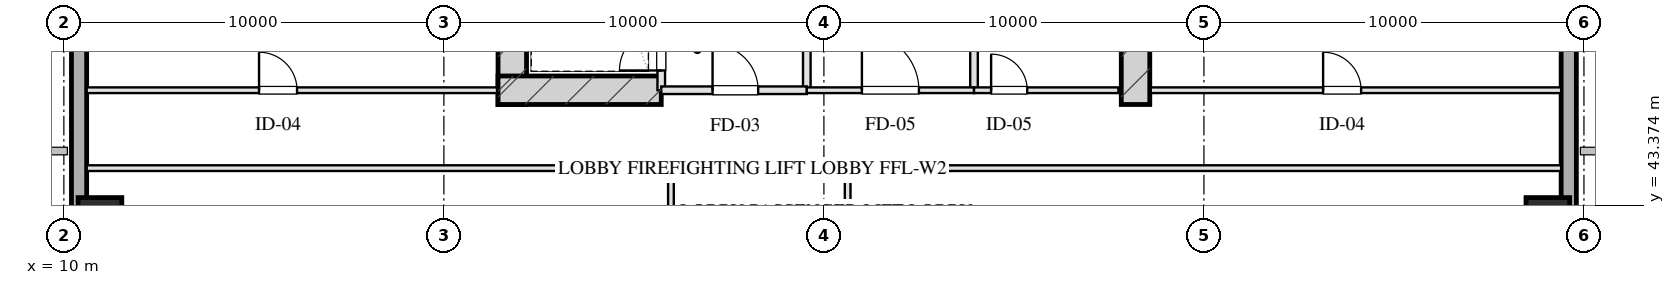
"""IFC4 building model, lengths in metres.
Left out: names, types, materials, properties, quantities, classifications, styles, units other than length and angle.
Written with IfcOpenShell. Run it as: python <this file> out.ifc"""

import sys

from ifc_helpers import new_model, si_unit, direction, frame, frame_2d, origin, origin_2d, place, context, subcontext, project, spatial, rectangle, hollow_rectangle, extrude, element, fill, save


model = new_model("IFC4")
c1 = context("Model", 3, precision=1e-05, world=origin(), true_north=direction((0.0, 1.0)))
c2 = subcontext(c1, "Body", "Model", "MODEL_VIEW")
j1 = project(units=[si_unit("LENGTHUNIT", "METRE"), si_unit("PLANEANGLEUNIT", "RADIAN")], contexts=[c1])
p1 = place(None, origin())
s1 = spatial("IfcSite", under=j1, at=p1, CompositionType="ELEMENT")
p2 = place(p1, origin())
s2 = spatial("IfcBuilding", under=s1, at=p2, CompositionType="ELEMENT")
p3 = place(p2, frame((0.0, 0.0, 34.0)))
s3 = spatial("IfcBuildingStorey", under=s2, at=p3, CompositionType="ELEMENT", Elevation=34.0)
for number, where, z_axis, x_axis in (
    (1, (21.8, 46.025, 0.0), (0.0, 0.0, 1.0), (0.0, 1.0, 0.0)),
    (2, (38.2, 46.025, 0.0), (0.0, 0.0, 1.0), (0.0, 1.0, 0.0)),
):
    element("IfcWall", number, at=place(p3, frame(where, z_axis=z_axis, x_axis=x_axis)), inside=s3, PredefinedType="SHEAR", context=c2, shape_type="SweptSolid", body=[
        extrude(rectangle(XDim=9.63, YDim=0.75, at=frame_2d((4.815, 0.0))), origin(), (0.0, 0.0, 1.0), 4.0),
    ])
p4 = place(p3, frame((21.425, 46.4, 0.0), z_axis=(0.0, 0.0, 1.0), x_axis=(1.0, 0.0, 0.0)))
e3 = element("IfcWall", 3, at=p4, inside=s3, PredefinedType="SHEAR", context=c2, shape_type="SweptSolid", body=[
    extrude(rectangle(XDim=4.295, YDim=0.75, at=frame_2d((2.147, 0.0))), origin(), (0.0, 0.0, 1.0), 4.0),
])
for number, where, z_axis, x_axis in (
    (4, (10.95, 43.0, 0.0), (0.0, 0.0, 1.0), (1.0, 0.0, 0.0)),
    (5, (49.05, 43.0, 0.0), (0.0, 0.0, 1.0), (1.0, 0.0, 0.0)),
):
    element("IfcColumn", number, at=place(p3, frame(where, z_axis=z_axis, x_axis=x_axis)), inside=s3, PredefinedType="COLUMN", context=c2, shape_type="SweptSolid", body=[
        extrude(hollow_rectangle(XDim=1.15, YDim=1.15, WallThickness=0.04, at=origin_2d()), origin(), (0.0, 0.0, 1.0), 4.001),
    ])
p5 = place(p3, frame((10.4, 7.2, 0.0), z_axis=(0.0, 0.0, 1.0), x_axis=(0.0, 1.0, 0.0)))
e6 = element("IfcWall", 6, at=p5, inside=s3, PredefinedType="SOLIDWALL", context=c2, shape_type="SweptSolid", body=[
    extrude(rectangle(XDim=53.6, YDim=0.4, at=frame_2d((26.8, 0.0))), origin(), (0.0, 0.0, 1.0), 3.16),
])
p6 = place(p5, frame((22.95, 0.0, 0.75)))
e7 = element("IfcOpeningElement", 7, at=p6, cuts=e6, PredefinedType="OPENING", context=c2, shape_type="SweptSolid", body=[
    extrude(rectangle(XDim=2.5, YDim=1.75, at=frame_2d((1.25, 0.875))), frame((0.0, 0.21, 0.0), z_axis=(0.0, -1.0, 0.0), x_axis=(1.0, 0.0, 0.0)), (0.0, 0.0, 1.0), 0.42),
])
p7 = place(p5, frame((29.35, 0.0, 0.0)))
e8 = element("IfcOpeningElement", 8, at=p7, cuts=e6, PredefinedType="OPENING", context=c2, shape_type="SweptSolid", body=[
    extrude(rectangle(XDim=1.1, YDim=2.15, at=frame_2d((0.55, 1.075))), frame((0.0, 0.21, 0.0), z_axis=(0.0, -1.0, 0.0), x_axis=(1.0, 0.0, 0.0)), (0.0, 0.0, 1.0), 0.42),
])
p8 = place(p3, frame((49.6, 60.8, 0.0), z_axis=(0.0, 0.0, 1.0), x_axis=(0.0, -1.0, 0.0)))
e9 = element("IfcWall", 9, at=p8, inside=s3, PredefinedType="SOLIDWALL", context=c2, shape_type="SweptSolid", body=[
    extrude(rectangle(XDim=53.6, YDim=0.4, at=frame_2d((26.8, 0.0))), origin(), (0.0, 0.0, 1.0), 3.16),
])
p9 = place(p8, frame((28.15, 0.0, 0.75)))
e10 = element("IfcOpeningElement", 10, at=p9, cuts=e9, PredefinedType="OPENING", context=c2, shape_type="SweptSolid", body=[
    extrude(rectangle(XDim=2.5, YDim=1.75, at=frame_2d((1.25, 0.875))), frame((0.0, 0.21, 0.0), z_axis=(0.0, -1.0, 0.0), x_axis=(1.0, 0.0, 0.0)), (0.0, 0.0, 1.0), 0.42),
])
p10 = place(p8, frame((23.15, 0.0, 0.0)))
e11 = element("IfcOpeningElement", 11, at=p10, cuts=e9, PredefinedType="OPENING", context=c2, shape_type="SweptSolid", body=[
    extrude(rectangle(XDim=1.1, YDim=2.15, at=frame_2d((0.55, 1.075))), frame((0.0, 0.21, 0.0), z_axis=(0.0, -1.0, 0.0), x_axis=(1.0, 0.0, 0.0)), (0.0, 0.0, 1.0), 0.42),
])
p11 = place(p3, frame((25.72, 46.4, 0.0), z_axis=(0.0, 0.0, 1.0), x_axis=(0.0, 1.0, 0.0)))
e12 = element("IfcWall", 12, at=p11, inside=s3, PredefinedType="PARTITIONING", context=c2, shape_type="SweptSolid", body=[
    extrude(rectangle(XDim=1.9, YDim=0.2, at=frame_2d((0.95, 0.0))), origin(), (0.0, 0.0, 1.0), 3.725),
])
p12 = place(p11, frame((0.52, 0.0, 0.0)))
e13 = element("IfcOpeningElement", 13, at=p12, cuts=e12, PredefinedType="OPENING", context=c2, shape_type="SweptSolid", body=[
    extrude(rectangle(XDim=1.1, YDim=2.05, at=frame_2d((0.55, 1.025))), frame((0.0, 0.11, 0.0), z_axis=(0.0, -1.0, 0.0), x_axis=(1.0, 0.0, 0.0)), (0.0, 0.0, 1.0), 0.22),
])
p13 = place(p3, frame((29.55, 46.4, 0.0), z_axis=(0.0, 0.0, 1.0), x_axis=(0.0, 1.0, 0.0)))
e14 = element("IfcWall", 14, at=p13, inside=s3, PredefinedType="PARTITIONING", context=c2, shape_type="SweptSolid", body=[
    extrude(rectangle(XDim=8.43, YDim=0.2, at=frame_2d((4.215, 0.0))), origin(), (0.0, 0.0, 1.0), 3.725),
])
p14 = place(p3, frame((25.72, 46.4, 0.0), z_axis=(0.0, 0.0, 1.0), x_axis=(1.0, 0.0, 0.0)))
e15 = element("IfcWall", 15, at=p14, inside=s3, PredefinedType="PARTITIONING", context=c2, shape_type="SweptSolid", body=[
    extrude(rectangle(XDim=3.83, YDim=0.2, at=frame_2d((1.915, 0.0))), origin(), (0.0, 0.0, 1.0), 3.725),
])
p15 = place(p14, frame((1.35, 0.0, 0.0)))
e16 = element("IfcOpeningElement", 16, at=p15, cuts=e15, PredefinedType="OPENING", context=c2, shape_type="SweptSolid", body=[
    extrude(rectangle(XDim=1.2, YDim=2.05, at=frame_2d((0.6, 1.025))), frame((0.0, 0.11, 0.0), z_axis=(0.0, -1.0, 0.0), x_axis=(1.0, 0.0, 0.0)), (0.0, 0.0, 1.0), 0.22),
])
p16 = place(p3, frame((33.95, 46.4, 0.0), z_axis=(0.0, 0.0, 1.0), x_axis=(0.0, 1.0, 0.0)))
e17 = element("IfcWall", 17, at=p16, inside=s3, PredefinedType="PARTITIONING", context=c2, shape_type="SweptSolid", body=[
    extrude(rectangle(XDim=8.43, YDim=0.2, at=frame_2d((4.215, 0.0))), origin(), (0.0, 0.0, 1.0), 3.725),
])
p17 = place(p3, frame((29.55, 46.4, 0.0), z_axis=(0.0, 0.0, 1.0), x_axis=(1.0, 0.0, 0.0)))
e18 = element("IfcWall", 18, at=p17, inside=s3, PredefinedType="PARTITIONING", context=c2, shape_type="SweptSolid", body=[
    extrude(rectangle(XDim=4.4, YDim=0.15, at=frame_2d((2.2, 0.0))), origin(), (0.0, 0.0, 1.0), 3.725),
])
p18 = place(p17, frame((1.45, 0.0, 0.0)))
e19 = element("IfcOpeningElement", 19, at=p18, cuts=e18, PredefinedType="OPENING", context=c2, shape_type="SweptSolid", body=[
    extrude(rectangle(XDim=1.5, YDim=2.05, at=frame_2d((0.75, 1.025))), frame((0.0, 0.085, 0.0), z_axis=(0.0, -1.0, 0.0), x_axis=(1.0, 0.0, 0.0)), (0.0, 0.0, 1.0), 0.17),
])
p19 = place(p3, frame((33.95, 46.4, 0.0), z_axis=(0.0, 0.0, 1.0), x_axis=(1.0, 0.0, 0.0)))
e20 = element("IfcWall", 20, at=p19, inside=s3, PredefinedType="PARTITIONING", context=c2, shape_type="SweptSolid", body=[
    extrude(rectangle(XDim=3.8, YDim=0.15, at=frame_2d((1.9, 0.0))), origin(), (0.0, 0.0, 1.0), 3.725),
])
p20 = place(p19, frame((0.45, 0.0, 0.0)))
e21 = element("IfcOpeningElement", 21, at=p20, cuts=e20, PredefinedType="OPENING", context=c2, shape_type="SweptSolid", body=[
    extrude(rectangle(XDim=0.95, YDim=2.05, at=frame_2d((0.475, 1.025))), frame((0.0, 0.085, 0.0), z_axis=(0.0, -1.0, 0.0), x_axis=(1.0, 0.0, 0.0)), (0.0, 0.0, 1.0), 0.17),
])
p21 = place(p3, frame((10.6, 46.4, 0.0), z_axis=(0.0, 0.0, 1.0), x_axis=(1.0, 0.0, 0.0)))
e22 = element("IfcWall", 22, at=p21, inside=s3, PredefinedType="PARTITIONING", context=c2, shape_type="SweptSolid", body=[
    extrude(rectangle(XDim=10.8, YDim=0.15, at=frame_2d((5.4, 0.0))), origin(), (0.0, 0.0, 1.0), 3.725),
])
p22 = place(p21, frame((4.536, 0.0, 0.0)))
e23 = element("IfcOpeningElement", 23, at=p22, cuts=e22, PredefinedType="OPENING", context=c2, shape_type="SweptSolid", body=[
    extrude(rectangle(XDim=1.0, YDim=2.05, at=frame_2d((0.5, 1.025))), frame((0.0, 0.085, 0.0), z_axis=(0.0, -1.0, 0.0), x_axis=(1.0, 0.0, 0.0)), (0.0, 0.0, 1.0), 0.17),
])
p23 = place(p3, frame((38.6, 46.4, 0.0), z_axis=(0.0, 0.0, 1.0), x_axis=(1.0, 0.0, 0.0)))
e24 = element("IfcWall", 24, at=p23, inside=s3, PredefinedType="PARTITIONING", context=c2, shape_type="SweptSolid", body=[
    extrude(rectangle(XDim=10.8, YDim=0.15, at=frame_2d((5.4, 0.0))), origin(), (0.0, 0.0, 1.0), 3.725),
])
p24 = place(p23, frame((4.536, 0.0, 0.0)))
e25 = element("IfcOpeningElement", 25, at=p24, cuts=e24, PredefinedType="OPENING", context=c2, shape_type="SweptSolid", body=[
    extrude(rectangle(XDim=1.0, YDim=2.05, at=frame_2d((0.5, 1.025))), frame((0.0, 0.085, 0.0), z_axis=(0.0, -1.0, 0.0), x_axis=(1.0, 0.0, 0.0)), (0.0, 0.0, 1.0), 0.17),
])
p25 = place(p3, frame((10.6, 44.35, 0.0), z_axis=(0.0, 0.0, 1.0), x_axis=(1.0, 0.0, 0.0)))
e26 = element("IfcWall", 26, at=p25, inside=s3, PredefinedType="PARTITIONING", context=c2, shape_type="SweptSolid", body=[
    extrude(rectangle(XDim=15.375, YDim=0.15, at=frame_2d((7.688, 0.0))), origin(), (0.0, 0.0, 1.0), 3.725),
])
p26 = place(p3, frame((30.625, 44.35, 0.0), z_axis=(0.0, 0.0, 1.0), x_axis=(1.0, 0.0, 0.0)))
e27 = element("IfcWall", 27, at=p26, inside=s3, PredefinedType="PARTITIONING", context=c2, shape_type="SweptSolid", body=[
    extrude(rectangle(XDim=18.775, YDim=0.15, at=frame_2d((9.387, 0.0))), origin(), (0.0, 0.0, 1.0), 3.725),
])
p27 = place(p3, frame((25.975, 23.65, 0.0), z_axis=(0.0, 0.0, 1.0), x_axis=(0.0, 1.0, 0.0)))
e28 = element("IfcWall", 28, at=p27, inside=s3, PredefinedType="PARTITIONING", context=c2, shape_type="SweptSolid", body=[
    extrude(rectangle(XDim=20.7, YDim=0.15, at=frame_2d((10.35, 0.0))), origin(), (0.0, 0.0, 1.0), 3.725),
])
p28 = place(p27, frame((2.175, 0.0, 0.0)))
e29 = element("IfcOpeningElement", 29, at=p28, cuts=e28, PredefinedType="OPENING", context=c2, shape_type="SweptSolid", body=[
    extrude(rectangle(XDim=1.0, YDim=2.05, at=frame_2d((0.5, 1.025))), frame((0.0, 0.085, 0.0), z_axis=(0.0, -1.0, 0.0), x_axis=(1.0, 0.0, 0.0)), (0.0, 0.0, 1.0), 0.17),
])
p29 = place(p27, frame((7.69, 0.0, 0.0)))
e30 = element("IfcOpeningElement", 30, at=p29, cuts=e28, PredefinedType="OPENING", context=c2, shape_type="SweptSolid", body=[
    extrude(rectangle(XDim=1.05, YDim=2.05, at=frame_2d((0.525, 1.025))), frame((0.0, 0.085, 0.0), z_axis=(0.0, -1.0, 0.0), x_axis=(1.0, 0.0, 0.0)), (0.0, 0.0, 1.0), 0.17),
])
p30 = place(p27, frame((12.69, 0.0, 0.0)))
e31 = element("IfcOpeningElement", 31, at=p30, cuts=e28, PredefinedType="OPENING", context=c2, shape_type="SweptSolid", body=[
    extrude(rectangle(XDim=1.0, YDim=2.05, at=frame_2d((0.5, 1.025))), frame((0.0, 0.085, 0.0), z_axis=(0.0, -1.0, 0.0), x_axis=(1.0, 0.0, 0.0)), (0.0, 0.0, 1.0), 0.17),
])
p31 = place(p27, frame((17.525, 0.0, 0.0)))
e32 = element("IfcOpeningElement", 32, at=p31, cuts=e28, PredefinedType="OPENING", context=c2, shape_type="SweptSolid", body=[
    extrude(rectangle(XDim=1.0, YDim=2.05, at=frame_2d((0.5, 1.025))), frame((0.0, 0.085, 0.0), z_axis=(0.0, -1.0, 0.0), x_axis=(1.0, 0.0, 0.0)), (0.0, 0.0, 1.0), 0.17),
])
p32 = place(p3, frame((30.625, 23.65, 0.0), z_axis=(0.0, 0.0, 1.0), x_axis=(0.0, 1.0, 0.0)))
e33 = element("IfcWall", 33, at=p32, inside=s3, PredefinedType="PARTITIONING", context=c2, shape_type="SweptSolid", body=[
    extrude(rectangle(XDim=20.7, YDim=0.15, at=frame_2d((10.35, 0.0))), origin(), (0.0, 0.0, 1.0), 3.725),
])
p33 = place(p32, frame((2.191, 0.0, 0.0)))
e34 = element("IfcOpeningElement", 34, at=p33, cuts=e33, PredefinedType="OPENING", context=c2, shape_type="SweptSolid", body=[
    extrude(rectangle(XDim=1.0, YDim=2.05, at=frame_2d((0.5, 1.025))), frame((0.0, 0.085, 0.0), z_axis=(0.0, -1.0, 0.0), x_axis=(1.0, 0.0, 0.0)), (0.0, 0.0, 1.0), 0.17),
])
p34 = place(p32, frame((7.78, 0.0, 0.0)))
e35 = element("IfcOpeningElement", 35, at=p34, cuts=e33, PredefinedType="OPENING", context=c2, shape_type="SweptSolid", body=[
    extrude(rectangle(XDim=1.0, YDim=2.05, at=frame_2d((0.5, 1.025))), frame((0.0, 0.085, 0.0), z_axis=(0.0, -1.0, 0.0), x_axis=(1.0, 0.0, 0.0)), (0.0, 0.0, 1.0), 0.17),
])
p35 = place(p32, frame((12.764, 0.0, 0.0)))
e36 = element("IfcOpeningElement", 36, at=p35, cuts=e33, PredefinedType="OPENING", context=c2, shape_type="SweptSolid", body=[
    extrude(rectangle(XDim=1.0, YDim=2.05, at=frame_2d((0.5, 1.025))), frame((0.0, 0.085, 0.0), z_axis=(0.0, -1.0, 0.0), x_axis=(1.0, 0.0, 0.0)), (0.0, 0.0, 1.0), 0.17),
])
p36 = place(p32, frame((17.525, 0.0, 0.0)))
e37 = element("IfcOpeningElement", 37, at=p36, cuts=e33, PredefinedType="OPENING", context=c2, shape_type="SweptSolid", body=[
    extrude(rectangle(XDim=0.85, YDim=2.05, at=frame_2d((0.425, 1.025))), frame((0.0, 0.085, 0.0), z_axis=(0.0, -1.0, 0.0), x_axis=(1.0, 0.0, 0.0)), (0.0, 0.0, 1.0), 0.17),
])
p37 = place(p12, origin())
e38 = element("IfcDoor", 38, at=p37, inside=s3, OperationType="SINGLE_SWING_LEFT", PredefinedType="DOOR", context=c2, shape_type="SweptSolid", body=[
    extrude(rectangle(XDim=1.1, YDim=2.05, at=frame_2d((0.55, 1.025))), frame((0.0, 0.025, 0.0), z_axis=(0.0, -1.0, 0.0), x_axis=(1.0, 0.0, 0.0)), (0.0, 0.0, 1.0), 0.05),
])
fill(e13, e38)
p38 = place(p15, origin())
e39 = element("IfcDoor", 39, at=p38, inside=s3, OperationType="SINGLE_SWING_LEFT", PredefinedType="DOOR", context=c2, shape_type="SweptSolid", body=[
    extrude(rectangle(XDim=1.2, YDim=2.05, at=frame_2d((0.6, 1.025))), frame((0.0, 0.025, 0.0), z_axis=(0.0, -1.0, 0.0), x_axis=(1.0, 0.0, 0.0)), (0.0, 0.0, 1.0), 0.05),
])
fill(e16, e39)
p39 = place(p18, origin())
e40 = element("IfcDoor", 40, at=p39, inside=s3, OperationType="SINGLE_SWING_LEFT", PredefinedType="DOOR", context=c2, shape_type="SweptSolid", body=[
    extrude(rectangle(XDim=1.5, YDim=2.05, at=frame_2d((0.75, 1.025))), frame((0.0, 0.025, 0.0), z_axis=(0.0, -1.0, 0.0), x_axis=(1.0, 0.0, 0.0)), (0.0, 0.0, 1.0), 0.05),
])
fill(e19, e40)
p40 = place(p20, origin())
e41 = element("IfcDoor", 41, at=p40, inside=s3, OperationType="SINGLE_SWING_LEFT", PredefinedType="DOOR", context=c2, shape_type="SweptSolid", body=[
    extrude(rectangle(XDim=0.95, YDim=2.05, at=frame_2d((0.475, 1.025))), frame((0.0, 0.025, 0.0), z_axis=(0.0, -1.0, 0.0), x_axis=(1.0, 0.0, 0.0)), (0.0, 0.0, 1.0), 0.05),
])
fill(e21, e41)
p41 = place(p22, origin())
e42 = element("IfcDoor", 42, at=p41, inside=s3, OperationType="SINGLE_SWING_LEFT", PredefinedType="DOOR", context=c2, shape_type="SweptSolid", body=[
    extrude(rectangle(XDim=1.0, YDim=2.05, at=frame_2d((0.5, 1.025))), frame((0.0, 0.025, 0.0), z_axis=(0.0, -1.0, 0.0), x_axis=(1.0, 0.0, 0.0)), (0.0, 0.0, 1.0), 0.05),
])
fill(e23, e42)
p42 = place(p24, origin())
e43 = element("IfcDoor", 43, at=p42, inside=s3, OperationType="SINGLE_SWING_LEFT", PredefinedType="DOOR", context=c2, shape_type="SweptSolid", body=[
    extrude(rectangle(XDim=1.0, YDim=2.05, at=frame_2d((0.5, 1.025))), frame((0.0, 0.025, 0.0), z_axis=(0.0, -1.0, 0.0), x_axis=(1.0, 0.0, 0.0)), (0.0, 0.0, 1.0), 0.05),
])
fill(e25, e43)
save(model, sys.argv[1])
